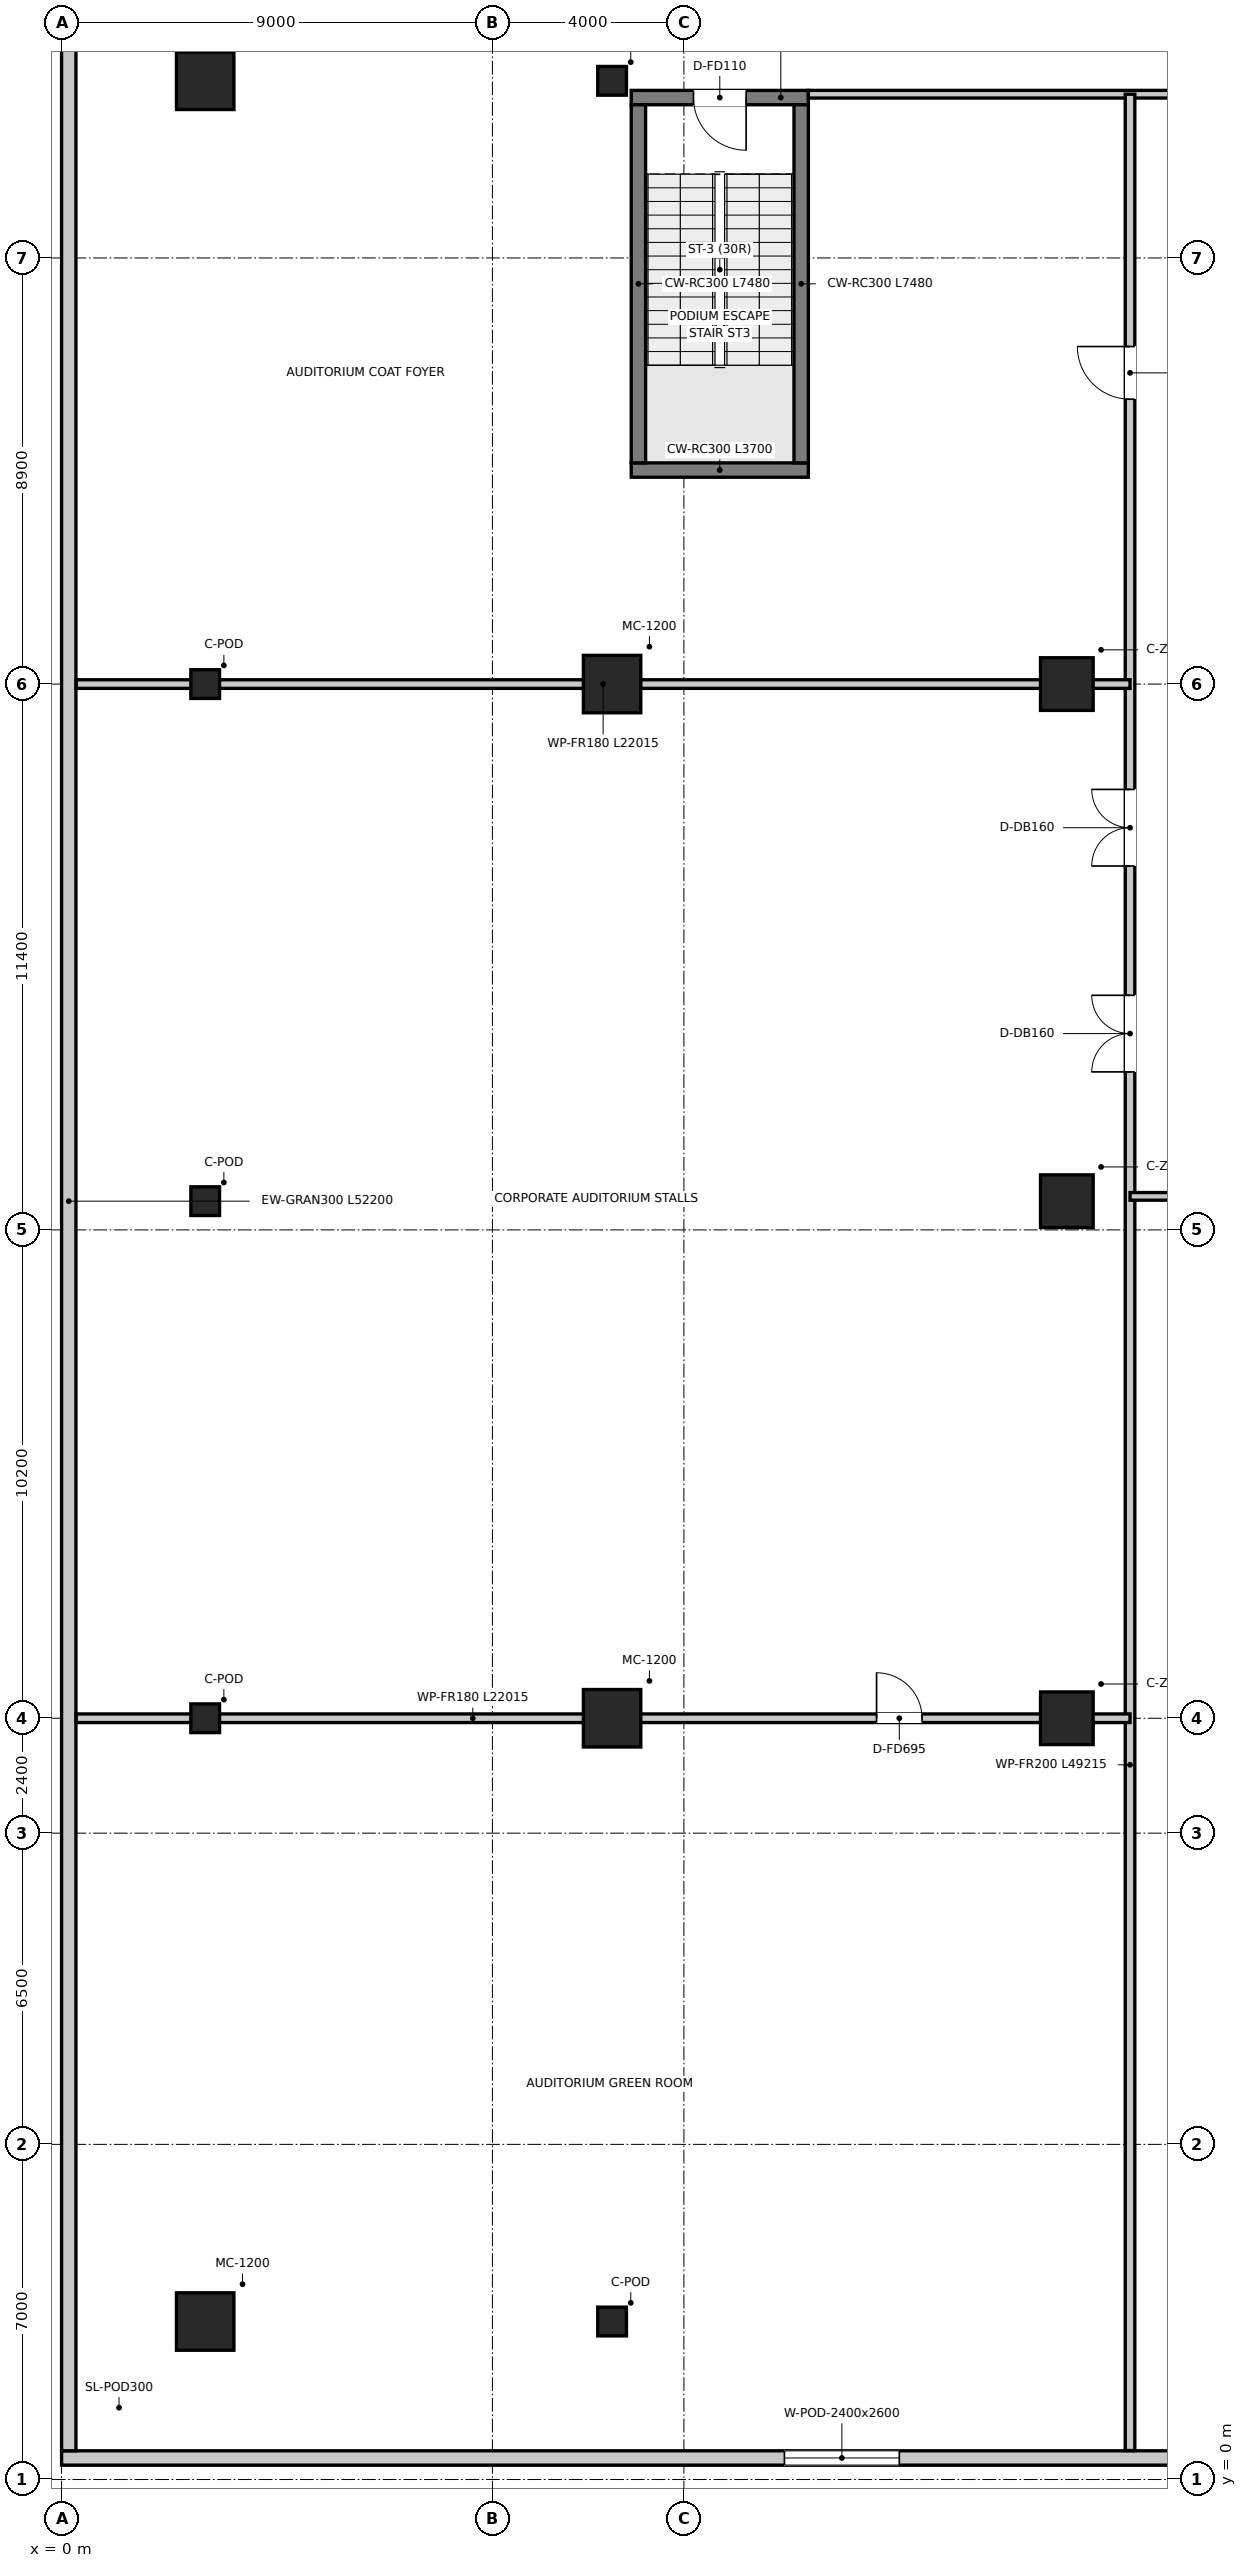
"""IFC4 building model, lengths in metres.
Left out: names, types, materials, properties, quantities, classifications, styles, units other than length and angle.
Written with IfcOpenShell. Run it as: python <this file> out.ifc"""

import sys

from ifc_helpers import new_model, si_unit, direction, frame, frame_2d, origin, origin_2d, place, context, subcontext, project, spatial, rectangle, extrude, source, transform, mapped, element, fill, save


model = new_model("IFC4")
c1 = context("Model", 3, precision=1e-05, world=origin(), true_north=direction((0.0, 1.0)))
c2 = subcontext(c1, "Body", "Model", "MODEL_VIEW")
j1 = project(units=[si_unit("LENGTHUNIT", "METRE"), si_unit("PLANEANGLEUNIT", "RADIAN")], contexts=[c1])
p1 = place(None, origin())
s1 = spatial("IfcSite", under=j1, at=p1, CompositionType="ELEMENT")
p2 = place(p1, origin())
s2 = spatial("IfcBuilding", under=s1, at=p2, CompositionType="ELEMENT")
p3 = place(p2, frame((0.0, 0.0, 5.4)))
s3 = spatial("IfcBuildingStorey", under=s2, at=p3, CompositionType="ELEMENT", Elevation=5.4)
p4 = place(p3, frame((11.9, 41.97, 0.0), z_axis=(0.0, 0.0, 1.0), x_axis=(1.0, 0.0, 0.0)))
e1 = element("IfcWall", 1, at=p4, inside=s3, PredefinedType="SHEAR", context=c2, shape_type="SweptSolid", body=[
    extrude(rectangle(XDim=3.7, YDim=0.3, at=frame_2d((1.85, 0.0))), origin(), (0.0, 0.0, 1.0), 5.0),
])
p5 = place(p3, frame((15.6, 49.75, 0.0), z_axis=(0.0, 0.0, 1.0), x_axis=(-1.0, 0.0, 0.0)))
e2 = element("IfcWall", 2, at=p5, inside=s3, PredefinedType="SHEAR", context=c2, shape_type="SweptSolid", body=[
    extrude(rectangle(XDim=3.7, YDim=0.3, at=frame_2d((1.85, 0.0))), origin(), (0.0, 0.0, 1.0), 5.0),
])
p6 = place(p5, frame((1.3, 0.0, 0.0)))
e3 = element("IfcOpeningElement", 3, at=p6, cuts=e2, PredefinedType="OPENING", context=c2, shape_type="SweptSolid", body=[
    extrude(rectangle(XDim=1.1, YDim=2.15, at=frame_2d((0.55, 1.075))), frame((0.0, 0.16, 0.0), z_axis=(0.0, -1.0, 0.0), x_axis=(1.0, 0.0, 0.0)), (0.0, 0.0, 1.0), 0.32),
])
for number, where, z_axis, x_axis in (
    (4, (12.05, 42.12, 0.0), (0.0, 0.0, 1.0), (0.0, 1.0, 0.0)),
    (5, (15.45, 42.12, 0.0), (0.0, 0.0, 1.0), (0.0, 1.0, 0.0)),
):
    element("IfcWall", number, at=place(p3, frame(where, z_axis=z_axis, x_axis=x_axis)), inside=s3, PredefinedType="SHEAR", context=c2, shape_type="SweptSolid", body=[
        extrude(rectangle(XDim=7.48, YDim=0.3, at=frame_2d((3.74, 0.0))), origin(), (0.0, 0.0, 1.0), 5.0),
    ])
m1 = source(origin(), c2, "Body", "SweptSolid", [
    extrude(rectangle(XDim=1.1, YDim=1.1, at=origin_2d()), origin(), (0.0, 0.0, 1.0), 5.0),
])
for number, where, z_axis, x_axis in (
    (6, (21.0, 15.9, 0.0), (0.0, 0.0, 1.0), (1.0, 0.0, 0.0)),
    (7, (21.0, 26.7, 0.0), (0.0, 0.0, 1.0), (1.0, 0.0, 0.0)),
    (8, (21.0, 37.5, 0.0), (0.0, 0.0, 1.0), (1.0, 0.0, 0.0)),
):
    element("IfcColumn", number, at=place(p3, frame(where, z_axis=z_axis, x_axis=x_axis)), inside=s3, PredefinedType="COLUMN", context=c2, shape_type="MappedRepresentation", body=[
        mapped(m1, transform((0.0, 0.0, 0.0), x_axis=(1.0, 0.0, 0.0), y_axis=(0.0, 1.0, 0.0), z_axis=(0.0, 0.0, 1.0), scale=1.0)),
    ])
m2 = source(origin(), c2, "Body", "SweptSolid", [
    extrude(rectangle(XDim=0.6, YDim=0.6, at=origin_2d()), origin(), (0.0, 0.0, 1.0), 5.0),
])
for number, where, z_axis, x_axis in (
    (9, (3.0, 15.9, 0.0), (0.0, 0.0, 1.0), (1.0, 0.0, 0.0)),
    (10, (3.0, 26.7, 0.0), (0.0, 0.0, 1.0), (1.0, 0.0, 0.0)),
    (11, (3.0, 37.5, 0.0), (0.0, 0.0, 1.0), (1.0, 0.0, 0.0)),
):
    element("IfcColumn", number, at=place(p3, frame(where, z_axis=z_axis, x_axis=x_axis)), inside=s3, PredefinedType="COLUMN", context=c2, shape_type="MappedRepresentation", body=[
        mapped(m2, transform((0.0, 0.0, 0.0), x_axis=(1.0, 0.0, 0.0), y_axis=(0.0, 1.0, 0.0), z_axis=(0.0, 0.0, 1.0), scale=1.0)),
    ])
m3 = source(origin(), c2, "Body", "SweptSolid", [
    extrude(rectangle(XDim=1.2, YDim=1.2, at=origin_2d()), origin(), (0.0, 0.0, 1.0), 5.0),
])
for number, where, z_axis, x_axis in (
    (12, (3.0, 3.3, 0.0), (0.0, 0.0, 1.0), (1.0, 0.0, 0.0)),
    (13, (3.0, 50.1, 0.0), (0.0, 0.0, 1.0), (1.0, 0.0, 0.0)),
    (14, (11.5, 15.9, 0.0), (0.0, 0.0, 1.0), (1.0, 0.0, 0.0)),
    (15, (11.5, 37.5, 0.0), (0.0, 0.0, 1.0), (1.0, 0.0, 0.0)),
):
    element("IfcColumn", number, at=place(p3, frame(where, z_axis=z_axis, x_axis=x_axis)), inside=s3, PredefinedType="USERDEFINED", context=c2, shape_type="MappedRepresentation", body=[
        mapped(m3, transform((0.0, 0.0, 0.0), x_axis=(1.0, 0.0, 0.0), y_axis=(0.0, 1.0, 0.0), z_axis=(0.0, 0.0, 1.0), scale=1.0)),
    ])
for number, where, z_axis, x_axis in (
    (16, (11.5, 50.1, 0.0), (0.0, 0.0, 1.0), (1.0, 0.0, 0.0)),
    (17, (11.5, 3.3, 0.0), (0.0, 0.0, 1.0), (1.0, 0.0, 0.0)),
):
    element("IfcColumn", number, at=place(p3, frame(where, z_axis=z_axis, x_axis=x_axis)), inside=s3, PredefinedType="COLUMN", context=c2, shape_type="MappedRepresentation", body=[
        mapped(m2, transform((0.0, 0.0, 0.0), x_axis=(1.0, 0.0, 0.0), y_axis=(0.0, 1.0, 0.0), z_axis=(0.0, 0.0, 1.0), scale=1.0)),
    ])
p7 = place(p3, frame((72.0, 0.45, 0.0), z_axis=(0.0, 0.0, 1.0), x_axis=(-1.0, 0.0, 0.0)))
e18 = element("IfcWall", 18, at=p7, inside=s3, PredefinedType="SOLIDWALL", context=c2, shape_type="SweptSolid", body=[
    extrude(rectangle(XDim=72.0, YDim=0.3, at=frame_2d((36.0, 0.0))), origin(), (0.0, 0.0, 1.0), 4.7),
])
p8 = place(p7, frame((54.5, 0.0, 0.9)))
e19 = element("IfcOpeningElement", 19, at=p8, cuts=e18, PredefinedType="OPENING", context=c2, shape_type="SweptSolid", body=[
    extrude(rectangle(XDim=2.4, YDim=2.6, at=frame_2d((1.2, 1.3))), frame((0.0, 0.16, 0.0), z_axis=(0.0, -1.0, 0.0), x_axis=(1.0, 0.0, 0.0)), (0.0, 0.0, 1.0), 0.32),
])
p9 = place(p7, frame((45.5, 0.0, 0.9)))
e20 = element("IfcOpeningElement", 20, at=p9, cuts=e18, PredefinedType="OPENING", context=c2, shape_type="SweptSolid", body=[
    extrude(rectangle(XDim=1.8, YDim=2.6, at=frame_2d((0.9, 1.3))), frame((0.0, 0.16, 0.0), z_axis=(0.0, -1.0, 0.0), x_axis=(1.0, 0.0, 0.0)), (0.0, 0.0, 1.0), 0.32),
])
p10 = place(p7, frame((39.0, 0.0, 0.95)))
e21 = element("IfcOpeningElement", 21, at=p10, cuts=e18, PredefinedType="OPENING", context=c2, shape_type="SweptSolid", body=[
    extrude(rectangle(XDim=1.5, YDim=2.4, at=frame_2d((0.75, 1.2))), frame((0.0, 0.16, 0.0), z_axis=(0.0, -1.0, 0.0), x_axis=(1.0, 0.0, 0.0)), (0.0, 0.0, 1.0), 0.32),
])
p11 = place(p7, frame((31.0, 0.0, 0.95)))
e22 = element("IfcOpeningElement", 22, at=p11, cuts=e18, PredefinedType="OPENING", context=c2, shape_type="SweptSolid", body=[
    extrude(rectangle(XDim=1.2, YDim=2.4, at=frame_2d((0.6, 1.2))), frame((0.0, 0.16, 0.0), z_axis=(0.0, -1.0, 0.0), x_axis=(1.0, 0.0, 0.0)), (0.0, 0.0, 1.0), 0.32),
])
p12 = place(p7, frame((21.5, 0.0, 0.9)))
e23 = element("IfcOpeningElement", 23, at=p12, cuts=e18, PredefinedType="OPENING", context=c2, shape_type="SweptSolid", body=[
    extrude(rectangle(XDim=3.0, YDim=2.6, at=frame_2d((1.5, 1.3))), frame((0.0, 0.16, 0.0), z_axis=(0.0, -1.0, 0.0), x_axis=(1.0, 0.0, 0.0)), (0.0, 0.0, 1.0), 0.32),
])
p13 = place(p3, frame((0.15, 0.6, 0.0), z_axis=(0.0, 0.0, 1.0), x_axis=(0.0, 1.0, 0.0)))
e24 = element("IfcWall", 24, at=p13, inside=s3, PredefinedType="SOLIDWALL", context=c2, shape_type="SweptSolid", body=[
    extrude(rectangle(XDim=52.2, YDim=0.3, at=frame_2d((26.1, 0.0))), origin(), (0.0, 0.0, 1.0), 4.7),
])
p14 = place(p3, frame((15.6, 49.82, 0.0), z_axis=(0.0, 0.0, 1.0), x_axis=(1.0, 0.0, 0.0)))
e25 = element("IfcWall", 25, at=p14, inside=s3, PredefinedType="PARTITIONING", context=c2, shape_type="SweptSolid", body=[
    extrude(rectangle(XDim=40.7, YDim=0.16, at=frame_2d((20.35, 0.0))), origin(), (0.0, 0.0, 1.0), 4.01),
])
p15 = place(p3, frame((22.32, 0.605, 0.0), z_axis=(0.0, 0.0, 1.0), x_axis=(0.0, 1.0, 0.0)))
e26 = element("IfcWall", 26, at=p15, inside=s3, PredefinedType="PARTITIONING", context=c2, shape_type="SweptSolid", body=[
    extrude(rectangle(XDim=49.215, YDim=0.2, at=frame_2d((24.607, 0.0))), origin(), (0.0, 0.0, 1.0), 4.0),
])
p16 = place(p15, frame((28.795, 0.0, 0.0)))
e27 = element("IfcOpeningElement", 27, at=p16, cuts=e26, PredefinedType="OPENING", context=c2, shape_type="SweptSolid", body=[
    extrude(rectangle(XDim=1.6, YDim=2.2, at=frame_2d((0.8, 1.1))), frame((0.0, 0.11, 0.0), z_axis=(0.0, -1.0, 0.0), x_axis=(1.0, 0.0, 0.0)), (0.0, 0.0, 1.0), 0.22),
])
p17 = place(p15, frame((33.095, 0.0, 0.0)))
e28 = element("IfcOpeningElement", 28, at=p17, cuts=e26, PredefinedType="OPENING", context=c2, shape_type="SweptSolid", body=[
    extrude(rectangle(XDim=1.6, YDim=2.2, at=frame_2d((0.8, 1.1))), frame((0.0, 0.11, 0.0), z_axis=(0.0, -1.0, 0.0), x_axis=(1.0, 0.0, 0.0)), (0.0, 0.0, 1.0), 0.22),
])
p18 = place(p15, frame((42.845, 0.0, 0.0)))
e29 = element("IfcOpeningElement", 29, at=p18, cuts=e26, PredefinedType="OPENING", context=c2, shape_type="SweptSolid", body=[
    extrude(rectangle(XDim=1.1, YDim=2.15, at=frame_2d((0.55, 1.075))), frame((0.0, 0.11, 0.0), z_axis=(0.0, -1.0, 0.0), x_axis=(1.0, 0.0, 0.0)), (0.0, 0.0, 1.0), 0.22),
])
p19 = place(p3, frame((22.32, 26.8, 0.0), z_axis=(0.0, 0.0, 1.0), x_axis=(1.0, 0.0, 0.0)))
e30 = element("IfcWall", 30, at=p19, inside=s3, PredefinedType="PARTITIONING", context=c2, shape_type="SweptSolid", body=[
    extrude(rectangle(XDim=5.68, YDim=0.16, at=frame_2d((2.84, 0.0))), origin(), (0.0, 0.0, 1.0), 3.9),
])
p20 = place(p19, frame((3.63, 0.0, 0.0)))
e31 = element("IfcOpeningElement", 31, at=p20, cuts=e30, PredefinedType="OPENING", context=c2, shape_type="SweptSolid", body=[
    extrude(rectangle(XDim=1.1, YDim=2.15, at=frame_2d((0.55, 1.075))), frame((0.0, 0.09, 0.0), z_axis=(0.0, -1.0, 0.0), x_axis=(1.0, 0.0, 0.0)), (0.0, 0.0, 1.0), 0.18),
])
p21 = place(p3, frame((0.305, 15.9, 0.0), z_axis=(0.0, 0.0, 1.0), x_axis=(1.0, 0.0, 0.0)))
e32 = element("IfcWall", 32, at=p21, inside=s3, PredefinedType="PARTITIONING", context=c2, shape_type="SweptSolid", body=[
    extrude(rectangle(XDim=22.015, YDim=0.18, at=frame_2d((11.008, 0.0))), origin(), (0.0, 0.0, 1.0), 2.9),
])
p22 = place(p21, frame((16.72, 0.0, 0.0)))
e33 = element("IfcOpeningElement", 33, at=p22, cuts=e32, PredefinedType="OPENING", context=c2, shape_type="SweptSolid", body=[
    extrude(rectangle(XDim=0.95, YDim=2.1, at=frame_2d((0.475, 1.05))), frame((0.0, 0.1, 0.0), z_axis=(0.0, -1.0, 0.0), x_axis=(1.0, 0.0, 0.0)), (0.0, 0.0, 1.0), 0.2),
])
p23 = place(p3, frame((0.305, 37.5, 0.0), z_axis=(0.0, 0.0, 1.0), x_axis=(1.0, 0.0, 0.0)))
e34 = element("IfcWall", 34, at=p23, inside=s3, PredefinedType="PARTITIONING", context=c2, shape_type="SweptSolid", body=[
    extrude(rectangle(XDim=22.015, YDim=0.18, at=frame_2d((11.008, 0.0))), origin(), (0.0, 0.0, 1.0), 2.9),
])
p24 = place(p8, origin())
e35 = element("IfcWindow", 35, at=p24, inside=s3, PartitioningType="SINGLE_PANEL", PredefinedType="WINDOW", context=c2, shape_type="SweptSolid", body=[
    extrude(rectangle(XDim=2.4, YDim=2.6, at=frame_2d((1.2, 1.3))), frame((0.0, 0.03, 0.0), z_axis=(0.0, -1.0, 0.0), x_axis=(1.0, 0.0, 0.0)), (0.0, 0.0, 1.0), 0.06),
])
fill(e19, e35)
p25 = place(p6, origin())
e36 = element("IfcDoor", 36, at=p25, inside=s3, OperationType="SINGLE_SWING_LEFT", PredefinedType="DOOR", context=c2, shape_type="SweptSolid", body=[
    extrude(rectangle(XDim=1.1, YDim=2.15, at=frame_2d((0.55, 1.075))), frame((0.0, 0.025, 0.0), z_axis=(0.0, -1.0, 0.0), x_axis=(1.0, 0.0, 0.0)), (0.0, 0.0, 1.0), 0.05),
])
fill(e3, e36)
p26 = place(p16, origin())
e37 = element("IfcDoor", 37, at=p26, inside=s3, OperationType="DOUBLE_DOOR_SINGLE_SWING", PredefinedType="DOOR", context=c2, shape_type="SweptSolid", body=[
    extrude(rectangle(XDim=1.6, YDim=2.2, at=frame_2d((0.8, 1.1))), frame((0.0, 0.025, 0.0), z_axis=(0.0, -1.0, 0.0), x_axis=(1.0, 0.0, 0.0)), (0.0, 0.0, 1.0), 0.05),
])
fill(e27, e37)
p27 = place(p17, origin())
e38 = element("IfcDoor", 38, at=p27, inside=s3, OperationType="DOUBLE_DOOR_SINGLE_SWING", PredefinedType="DOOR", context=c2, shape_type="SweptSolid", body=[
    extrude(rectangle(XDim=1.6, YDim=2.2, at=frame_2d((0.8, 1.1))), frame((0.0, 0.025, 0.0), z_axis=(0.0, -1.0, 0.0), x_axis=(1.0, 0.0, 0.0)), (0.0, 0.0, 1.0), 0.05),
])
fill(e28, e38)
p28 = place(p22, origin())
e39 = element("IfcDoor", 39, at=p28, inside=s3, OperationType="SINGLE_SWING_LEFT", PredefinedType="DOOR", context=c2, shape_type="SweptSolid", body=[
    extrude(rectangle(XDim=0.95, YDim=2.1, at=frame_2d((0.475, 1.05))), frame((0.0, 0.025, 0.0), z_axis=(0.0, -1.0, 0.0), x_axis=(1.0, 0.0, 0.0)), (0.0, 0.0, 1.0), 0.05),
])
fill(e33, e39)
p29 = place(p18, origin())
e40 = element("IfcDoor", 40, at=p29, inside=s3, OperationType="SINGLE_SWING_RIGHT", PredefinedType="DOOR", context=c2, shape_type="SweptSolid", body=[
    extrude(rectangle(XDim=1.1, YDim=2.15, at=frame_2d((0.55, 1.075))), frame((0.0, 0.025, 0.0), z_axis=(0.0, -1.0, 0.0), x_axis=(1.0, 0.0, 0.0)), (0.0, 0.0, 1.0), 0.05),
])
fill(e29, e40)
save(model, sys.argv[1])
